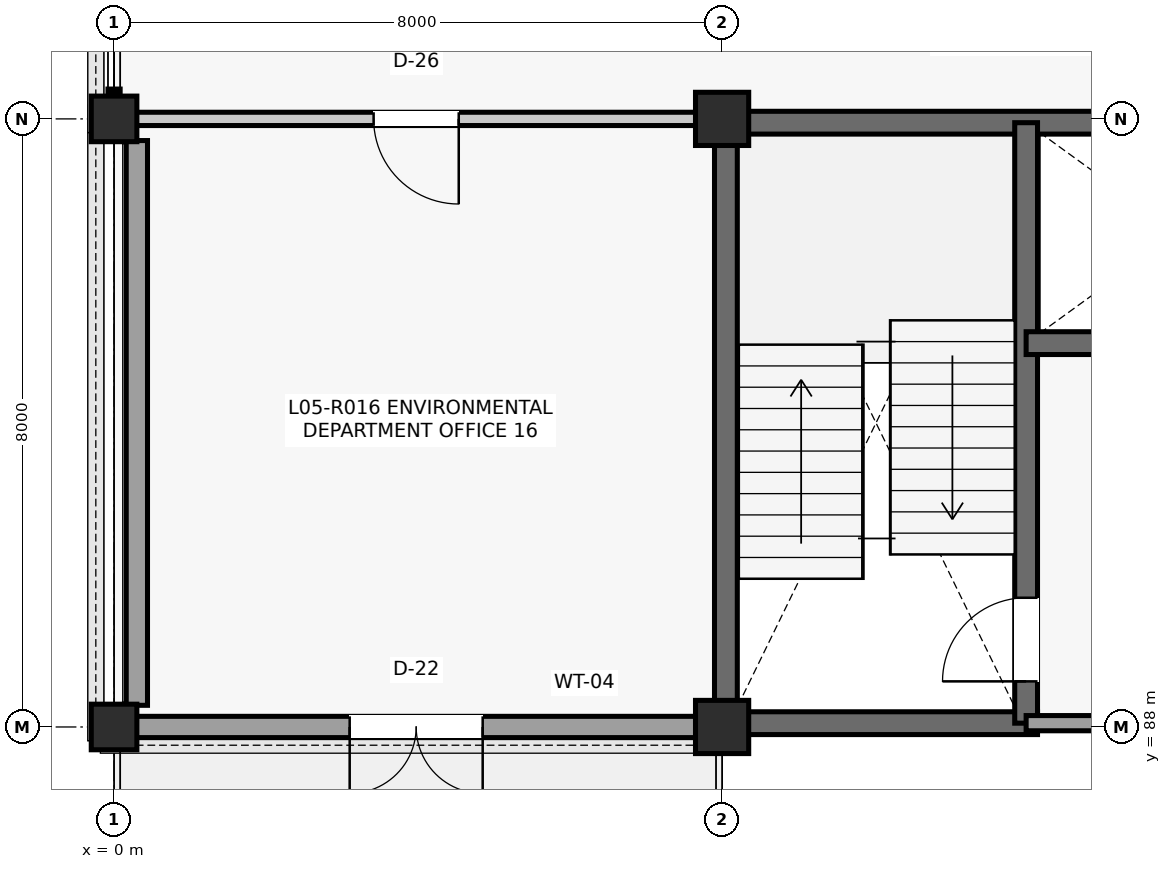
"""IFC4 building model, lengths in metres.
Left out: names, types, materials, properties, quantities, classifications, styles, units other than length and angle.
Written with IfcOpenShell. Run it as: python <this file> out.ifc"""

import sys

from ifc_helpers import new_model, si_unit, direction, frame, frame_2d, origin, origin_2d, place, context, subcontext, project, spatial, rectangle, extrude, element, fill, save


model = new_model("IFC4")
c1 = context("Model", 3, precision=1e-05, world=origin(), true_north=direction((0.0, 1.0)))
c2 = subcontext(c1, "Body", "Model", "MODEL_VIEW")
j1 = project(units=[si_unit("LENGTHUNIT", "METRE"), si_unit("PLANEANGLEUNIT", "RADIAN")], contexts=[c1])
p1 = place(None, origin())
s1 = spatial("IfcSite", under=j1, at=p1, CompositionType="ELEMENT")
p2 = place(p1, origin())
s2 = spatial("IfcBuilding", under=s1, at=p2, CompositionType="ELEMENT")
p3 = place(p2, frame((0.0, 0.0, 21.78)))
s3 = spatial("IfcBuildingStorey", under=s2, at=p3, CompositionType="ELEMENT", Elevation=21.78)
for number, where, z_axis, x_axis in (
    (1, (0.0, 88.0, 0.0), (0.0, 0.0, 1.0), (1.0, 0.0, 0.0)),
    (2, (0.0, 96.0, 0.0), (0.0, 0.0, 1.0), (1.0, 0.0, 0.0)),
):
    element("IfcColumn", number, at=place(p3, frame(where, z_axis=z_axis, x_axis=x_axis)), inside=s3, PredefinedType="COLUMN", context=c2, shape_type="SweptSolid", body=[
        extrude(rectangle(XDim=0.6, YDim=0.6, at=origin_2d()), origin(), (0.0, 0.0, 1.0), 3.96),
    ])
for number, where, z_axis, x_axis in (
    (3, (8.0, 88.0, 0.0), (0.0, 0.0, 1.0), (1.0, 0.0, 0.0)),
    (4, (8.0, 96.0, 0.0), (0.0, 0.0, 1.0), (1.0, 0.0, 0.0)),
):
    element("IfcColumn", number, at=place(p3, frame(where, z_axis=z_axis, x_axis=x_axis)), inside=s3, PredefinedType="COLUMN", context=c2, shape_type="SweptSolid", body=[
        extrude(rectangle(XDim=0.7, YDim=0.7, at=origin_2d()), origin(), (0.0, 0.0, 1.0), 3.96),
    ])
p4 = place(p3, frame((0.285, 88.0, 0.0), z_axis=(0.0, 0.0, 1.0), x_axis=(1.0, 0.0, 0.0)))
e5 = element("IfcWall", 5, at=p4, inside=s3, PredefinedType="SOLIDWALL", context=c2, shape_type="SweptSolid", body=[
    extrude(rectangle(XDim=7.38, YDim=0.28, at=frame_2d((3.69, 0.0))), origin(), (0.0, 0.0, 1.0), 3.464),
])
p5 = place(p4, frame((2.815, 0.0, 0.0)))
e6 = element("IfcOpeningElement", 6, at=p5, cuts=e5, PredefinedType="OPENING", context=c2, shape_type="SweptSolid", body=[
    extrude(rectangle(XDim=1.75, YDim=2.2, at=frame_2d((0.875, 1.1))), frame((0.0, 0.15, 0.0), z_axis=(0.0, -1.0, 0.0), x_axis=(1.0, 0.0, 0.0)), (0.0, 0.0, 1.0), 0.3),
])
p6 = place(p3, frame((0.3, 88.285, 0.0), z_axis=(0.0, 0.0, 1.0), x_axis=(0.0, 1.0, 0.0)))
e7 = element("IfcWall", 7, at=p6, inside=s3, PredefinedType="SOLIDWALL", context=c2, shape_type="SweptSolid", body=[
    extrude(rectangle(XDim=7.43, YDim=0.28, at=frame_2d((3.715, 0.0))), origin(), (0.0, 0.0, 1.0), 3.305),
])
for number, where, z_axis, x_axis in (
    (8, (8.05, 88.24, 0.0), (0.0, 0.0, 1.0), (0.0, 1.0, 0.0)),
    (9, (8.24, 95.95, 0.0), (0.0, 0.0, 1.0), (1.0, 0.0, 0.0)),
):
    element("IfcWall", number, at=place(p3, frame(where, z_axis=z_axis, x_axis=x_axis)), inside=s3, PredefinedType="SHEAR", context=c2, shape_type="SweptSolid", body=[
        extrude(rectangle(XDim=7.52, YDim=0.3, at=frame_2d((3.76, 0.0))), origin(), (0.0, 0.0, 1.0), 3.735),
    ])
p7 = place(p3, frame((8.24, 88.05, 0.0), z_axis=(0.0, 0.0, 1.0), x_axis=(1.0, 0.0, 0.0)))
e10 = element("IfcWall", 10, at=p7, inside=s3, PredefinedType="SHEAR", context=c2, shape_type="SweptSolid", body=[
    extrude(rectangle(XDim=3.91, YDim=0.3, at=frame_2d((1.955, 0.0))), origin(), (0.0, 0.0, 1.0), 3.735),
])
p8 = place(p3, frame((12.0, 88.05, 0.0), z_axis=(0.0, 0.0, 1.0), x_axis=(0.0, 1.0, 0.0)))
e11 = element("IfcWall", 11, at=p8, inside=s3, PredefinedType="SHEAR", context=c2, shape_type="SweptSolid", body=[
    extrude(rectangle(XDim=7.9, YDim=0.3, at=frame_2d((3.95, 0.0))), origin(), (0.0, 0.0, 1.0), 3.735),
])
p9 = place(p8, frame((0.55, 0.0, 0.0)))
e12 = element("IfcOpeningElement", 12, at=p9, cuts=e11, PredefinedType="OPENING", context=c2, shape_type="SweptSolid", body=[
    extrude(rectangle(XDim=1.1, YDim=2.15, at=frame_2d((0.55, 1.075))), frame((0.0, 0.16, 0.0), z_axis=(0.0, -1.0, 0.0), x_axis=(1.0, 0.0, 0.0)), (0.0, 0.0, 1.0), 0.32),
])
p10 = place(p3, frame((12.0, 93.05, 0.0), z_axis=(0.0, 0.0, 1.0), x_axis=(1.0, 0.0, 0.0)))
e13 = element("IfcWall", 13, at=p10, inside=s3, PredefinedType="SHEAR", context=c2, shape_type="SweptSolid", body=[
    extrude(rectangle(XDim=3.95, YDim=0.3, at=frame_2d((1.975, 0.0))), origin(), (0.0, 0.0, 1.0), 3.735),
])
p11 = place(p10, frame((1.375, 0.0, 0.0)))
e14 = element("IfcOpeningElement", 14, at=p11, cuts=e13, PredefinedType="OPENING", context=c2, shape_type="SweptSolid", body=[
    extrude(rectangle(XDim=1.2, YDim=2.2, at=frame_2d((0.6, 1.1))), frame((0.0, 0.16, 0.0), z_axis=(0.0, -1.0, 0.0), x_axis=(1.0, 0.0, 0.0)), (0.0, 0.0, 1.0), 0.32),
])
p12 = place(p3, frame((12.0, 88.05, 0.0), z_axis=(0.0, 0.0, 1.0), x_axis=(1.0, 0.0, 0.0)))
e15 = element("IfcWall", 15, at=p12, inside=s3, PredefinedType="PARTITIONING", context=c2, shape_type="SweptSolid", body=[
    extrude(rectangle(XDim=3.66, YDim=0.2, at=frame_2d((1.83, 0.0))), origin(), (0.0, 0.0, 1.0), 3.367),
])
p13 = place(p3, frame((0.29, 96.0, 0.0), z_axis=(0.0, 0.0, 1.0), x_axis=(1.0, 0.0, 0.0)))
e16 = element("IfcWall", 16, at=p13, inside=s3, PredefinedType="PARTITIONING", context=c2, shape_type="SweptSolid", body=[
    extrude(rectangle(XDim=7.37, YDim=0.175, at=frame_2d((3.685, 0.0))), origin(), (0.0, 0.0, 1.0), 3.252),
])
p14 = place(p13, frame((3.125, 0.0, 0.0)))
e17 = element("IfcOpeningElement", 17, at=p14, cuts=e16, PredefinedType="OPENING", context=c2, shape_type="SweptSolid", body=[
    extrude(rectangle(XDim=1.12, YDim=2.22, at=frame_2d((0.56, 1.11))), frame((0.0, 0.097, 0.0), z_axis=(0.0, -1.0, 0.0), x_axis=(1.0, 0.0, 0.0)), (0.0, 0.0, 1.0), 0.195),
])
p15 = place(p5, frame((1.75, 0.0, 0.0), z_axis=(0.0, 0.0, 1.0), x_axis=(-1.0, 0.0, 0.0)))
e18 = element("IfcDoor", 18, at=p15, inside=s3, OperationType="DOUBLE_DOOR_SINGLE_SWING", PredefinedType="DOOR", context=c2, shape_type="SweptSolid", body=[
    extrude(rectangle(XDim=1.75, YDim=2.2, at=frame_2d((0.875, 1.1))), frame((0.0, 0.025, 0.0), z_axis=(0.0, -1.0, 0.0), x_axis=(1.0, 0.0, 0.0)), (0.0, 0.0, 1.0), 0.05),
])
fill(e6, e18)
p16 = place(p9, origin())
e19 = element("IfcDoor", 19, at=p16, inside=s3, OperationType="SINGLE_SWING_LEFT", PredefinedType="DOOR", context=c2, shape_type="SweptSolid", body=[
    extrude(rectangle(XDim=1.1, YDim=2.15, at=frame_2d((0.55, 1.075))), frame((0.0, 0.025, 0.0), z_axis=(0.0, -1.0, 0.0), x_axis=(1.0, 0.0, 0.0)), (0.0, 0.0, 1.0), 0.05),
])
fill(e12, e19)
p17 = place(p14, frame((1.12, 0.0, 0.0), z_axis=(0.0, 0.0, 1.0), x_axis=(-1.0, 0.0, 0.0)))
e20 = element("IfcDoor", 20, at=p17, inside=s3, OperationType="SINGLE_SWING_RIGHT", PredefinedType="DOOR", context=c2, shape_type="SweptSolid", body=[
    extrude(rectangle(XDim=1.12, YDim=2.22, at=frame_2d((0.56, 1.11))), frame((0.0, 0.025, 0.0), z_axis=(0.0, -1.0, 0.0), x_axis=(1.0, 0.0, 0.0)), (0.0, 0.0, 1.0), 0.05),
])
fill(e17, e20)
save(model, sys.argv[1])
